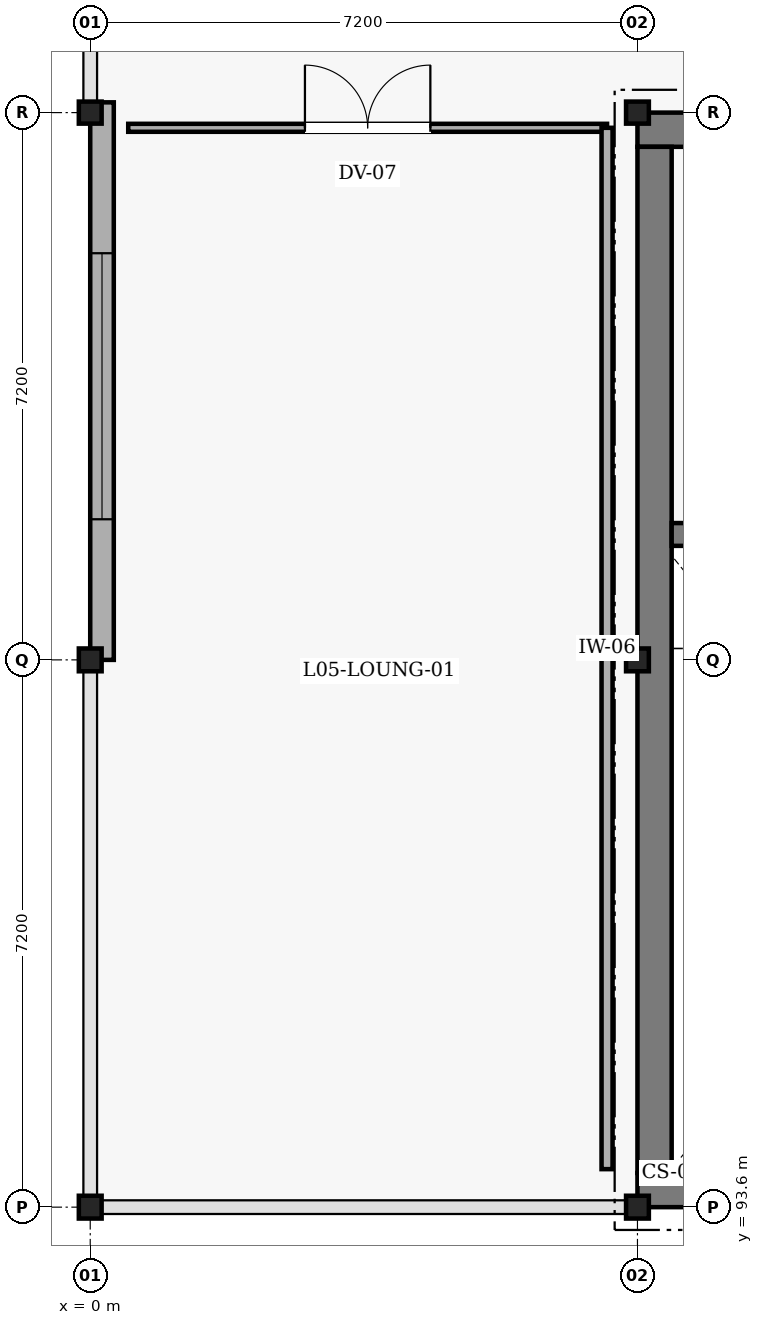
"""IFC4 building model, lengths in metres.
Left out: names, types, materials, properties, quantities, classifications, styles, units other than length and angle.
Written with IfcOpenShell. Run it as: python <this file> out.ifc"""

import sys

from ifc_helpers import new_model, si_unit, direction, frame, frame_2d, origin, origin_2d, place, context, subcontext, project, spatial, rectangle, i_section, extrude, element, fill, save


model = new_model("IFC4")
c1 = context("Model", 3, precision=1e-05, world=origin(), true_north=direction((0.0, 1.0)))
c2 = subcontext(c1, "Body", "Model", "MODEL_VIEW")
j1 = project(units=[si_unit("LENGTHUNIT", "METRE"), si_unit("PLANEANGLEUNIT", "RADIAN")], contexts=[c1])
p1 = place(None, origin())
s1 = spatial("IfcSite", under=j1, at=p1, CompositionType="ELEMENT")
p2 = place(p1, origin())
s2 = spatial("IfcBuilding", under=s1, at=p2, CompositionType="ELEMENT")
p3 = place(p2, frame((0.0, 0.0, 21.6)))
s3 = spatial("IfcBuildingStorey", under=s2, at=p3, CompositionType="ELEMENT", Elevation=21.6)
p4 = place(p3, frame((7.2, 107.775, 0.0), z_axis=(0.0, 0.0, 1.0), x_axis=(1.0, 0.0, 0.0)))
e1 = element("IfcWall", 1, at=p4, inside=s3, PredefinedType="SHEAR", context=c2, shape_type="SweptSolid", body=[
    extrude(rectangle(XDim=14.4, YDim=0.45, at=frame_2d((7.2, 0.0))), origin(), (0.0, 0.0, 1.0), 3.62),
])
p5 = place(p4, frame((2.4, 0.0, 0.0)))
e2 = element("IfcOpeningElement", 2, at=p5, cuts=e1, PredefinedType="OPENING", context=c2, shape_type="SweptSolid", body=[
    extrude(rectangle(XDim=1.25, YDim=2.2, at=frame_2d((0.625, 1.1))), frame((0.0, 0.235, 0.0), z_axis=(0.0, -1.0, 0.0), x_axis=(1.0, 0.0, 0.0)), (0.0, 0.0, 1.0), 0.47),
])
p6 = place(p3, frame((21.6, 93.825, 0.0), z_axis=(0.0, 0.0, 1.0), x_axis=(-1.0, 0.0, 0.0)))
e3 = element("IfcWall", 3, at=p6, inside=s3, PredefinedType="SHEAR", context=c2, shape_type="SweptSolid", body=[
    extrude(rectangle(XDim=14.4, YDim=0.45, at=frame_2d((7.2, 0.0))), origin(), (0.0, 0.0, 1.0), 3.62),
])
p7 = place(p3, frame((7.425, 94.05, 0.0), z_axis=(0.0, 0.0, 1.0), x_axis=(0.0, 1.0, 0.0)))
e4 = element("IfcWall", 4, at=p7, inside=s3, PredefinedType="SHEAR", context=c2, shape_type="SweptSolid", body=[
    extrude(rectangle(XDim=13.5, YDim=0.45, at=frame_2d((6.75, 0.0))), origin(), (0.0, 0.0, 1.0), 3.62),
])
p8 = place(p3, frame((7.65, 102.45, 0.0), z_axis=(0.0, 0.0, 1.0), x_axis=(1.0, 0.0, 0.0)))
e5 = element("IfcWall", 5, at=p8, inside=s3, PredefinedType="SHEAR", context=c2, shape_type="SweptSolid", body=[
    extrude(rectangle(XDim=6.575, YDim=0.3, at=frame_2d((3.288, 0.0))), origin(), (0.0, 0.0, 1.0), 3.62),
])
p9 = place(p8, frame((2.788, 0.0, 0.0)))
e6 = element("IfcOpeningElement", 6, at=p9, cuts=e5, PredefinedType="OPENING", context=c2, shape_type="SweptSolid", body=[
    extrude(rectangle(XDim=1.4, YDim=2.2, at=frame_2d((0.7, 1.1))), frame((0.0, 0.16, 0.0), z_axis=(0.0, -1.0, 0.0), x_axis=(1.0, 0.0, 0.0)), (0.0, 0.0, 1.0), 0.32),
])
for number, where, z_axis, x_axis in (
    (7, (0.0, 93.6, 0.0), (0.0, 0.0, 1.0), (0.0, 1.0, 0.0)),
    (8, (0.0, 100.8, 0.0), (0.0, 0.0, 1.0), (1.0, 0.0, 0.0)),
):
    element("IfcColumn", number, at=place(p3, frame(where, z_axis=z_axis, x_axis=x_axis)), inside=s3, PredefinedType="COLUMN", context=c2, shape_type="SweptSolid", body=[
        extrude(i_section(OverallWidth=0.3, OverallDepth=0.3, WebThickness=0.011, FlangeThickness=0.019, FilletRadius=0.027, at=origin_2d()), origin(), (0.0, 0.0, 1.0), 3.62),
    ])
p10 = place(p3, frame((0.0, 108.0, 0.0), z_axis=(0.0, 0.0, 1.0), x_axis=(1.0, 0.0, 0.0)))
e9 = element("IfcColumn", 9, at=p10, inside=s3, PredefinedType="COLUMN", context=c2, shape_type="SweptSolid", body=[
    extrude(i_section(OverallWidth=0.3, OverallDepth=0.29, WebThickness=0.009, FlangeThickness=0.014, FilletRadius=0.027, at=origin_2d()), origin(), (0.0, 0.0, 1.0), 3.62),
])
for number, where, z_axis, x_axis in (
    (10, (7.2, 93.6, 0.0), (0.0, 0.0, 1.0), (1.0, 0.0, 0.0)),
    (11, (7.2, 100.8, 0.0), (0.0, 0.0, 1.0), (1.0, 0.0, 0.0)),
):
    element("IfcColumn", number, at=place(p3, frame(where, z_axis=z_axis, x_axis=x_axis)), inside=s3, PredefinedType="COLUMN", context=c2, shape_type="SweptSolid", body=[
        extrude(i_section(OverallWidth=0.3, OverallDepth=0.3, WebThickness=0.011, FlangeThickness=0.019, FilletRadius=0.027, at=origin_2d()), origin(), (0.0, 0.0, 1.0), 3.62),
    ])
p11 = place(p3, frame((7.2, 108.0, 0.0), z_axis=(0.0, 0.0, 1.0), x_axis=(1.0, 0.0, 0.0)))
e12 = element("IfcColumn", 12, at=p11, inside=s3, PredefinedType="COLUMN", context=c2, shape_type="SweptSolid", body=[
    extrude(i_section(OverallWidth=0.3, OverallDepth=0.29, WebThickness=0.009, FlangeThickness=0.014, FilletRadius=0.027, at=origin_2d()), origin(), (0.0, 0.0, 1.0), 3.62),
])
p12 = place(p3, frame((0.155, 100.8, 0.0), z_axis=(0.0, 0.0, 1.0), x_axis=(0.0, 1.0, 0.0)))
e13 = element("IfcWall", 13, at=p12, inside=s3, PredefinedType="SOLIDWALL", context=c2, shape_type="SweptSolid", body=[
    extrude(rectangle(XDim=7.335, YDim=0.31, at=frame_2d((3.667, 0.0))), origin(), (0.0, 0.0, 1.0), 3.32),
])
p13 = place(p12, frame((1.85, 0.0, 0.9)))
e14 = element("IfcOpeningElement", 14, at=p13, cuts=e13, PredefinedType="OPENING", context=c2, shape_type="SweptSolid", body=[
    extrude(rectangle(XDim=3.5, YDim=1.8, at=frame_2d((1.75, 0.9))), frame((0.0, 0.165, 0.0), z_axis=(0.0, -1.0, 0.0), x_axis=(1.0, 0.0, 0.0)), (0.0, 0.0, 1.0), 0.33),
])
p14 = place(p3, frame((0.5, 107.8, 0.0), z_axis=(0.0, 0.0, 1.0), x_axis=(1.0, 0.0, 0.0)))
e15 = element("IfcWall", 15, at=p14, inside=s3, PredefinedType="PARTITIONING", context=c2, shape_type="SweptSolid", body=[
    extrude(rectangle(XDim=6.3, YDim=0.105, at=frame_2d((3.15, 0.0))), origin(), (0.0, 0.0, 1.0), 3.17),
])
p15 = place(p14, frame((2.325, 0.0, 0.0)))
e16 = element("IfcOpeningElement", 16, at=p15, cuts=e15, PredefinedType="OPENING", context=c2, shape_type="SweptSolid", body=[
    extrude(rectangle(XDim=1.65, YDim=2.25, at=frame_2d((0.825, 1.125))), frame((0.0, 0.062, 0.0), z_axis=(0.0, -1.0, 0.0), x_axis=(1.0, 0.0, 0.0)), (0.0, 0.0, 1.0), 0.125),
])
p16 = place(p3, frame((6.8, 107.8, 0.0), z_axis=(0.0, 0.0, 1.0), x_axis=(0.0, -1.0, 0.0)))
e17 = element("IfcWall", 17, at=p16, inside=s3, PredefinedType="PARTITIONING", context=c2, shape_type="SweptSolid", body=[
    extrude(rectangle(XDim=13.7, YDim=0.145, at=frame_2d((6.85, 0.0))), origin(), (0.0, 0.0, 1.0), 3.17),
])
p17 = place(p13, origin())
e18 = element("IfcWindow", 18, at=p17, inside=s3, PartitioningType="SINGLE_PANEL", PredefinedType="WINDOW", context=c2, shape_type="SweptSolid", body=[
    extrude(rectangle(XDim=3.5, YDim=1.8, at=frame_2d((1.75, 0.9))), frame((0.0, 0.03, 0.0), z_axis=(0.0, -1.0, 0.0), x_axis=(1.0, 0.0, 0.0)), (0.0, 0.0, 1.0), 0.06),
])
fill(e14, e18)
p18 = place(p15, origin())
e19 = element("IfcDoor", 19, at=p18, inside=s3, OperationType="DOUBLE_DOOR_SINGLE_SWING", PredefinedType="DOOR", context=c2, shape_type="SweptSolid", body=[
    extrude(rectangle(XDim=1.65, YDim=2.25, at=frame_2d((0.825, 1.125))), frame((0.0, 0.025, 0.0), z_axis=(0.0, -1.0, 0.0), x_axis=(1.0, 0.0, 0.0)), (0.0, 0.0, 1.0), 0.05),
])
fill(e16, e19)
save(model, sys.argv[1])
